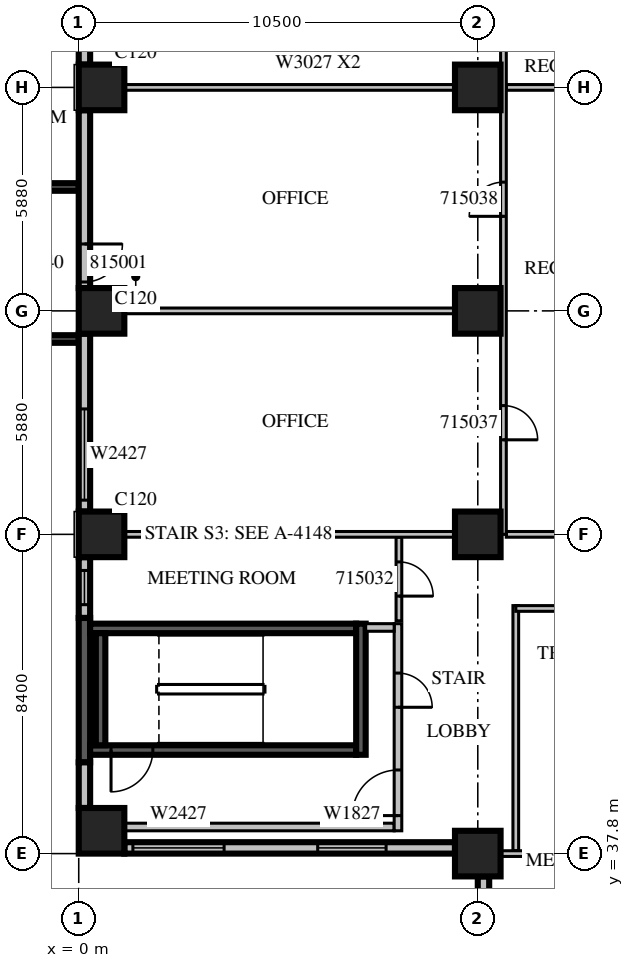
"""IFC4 building model, lengths in metres.
Left out: names, types, materials, properties, quantities, classifications, styles, units other than length and angle.
Written with IfcOpenShell. Run it as: python <this file> out.ifc"""

import sys

from ifc_helpers import new_model, si_unit, direction, frame, frame_2d, origin, origin_2d, place, context, subcontext, project, spatial, rectangle, extrude, source, transform, mapped, element, fill, save


model = new_model("IFC4")
c1 = context("Model", 3, precision=1e-05, world=origin(), true_north=direction((0.0, 1.0)))
c2 = subcontext(c1, "Body", "Model", "MODEL_VIEW")
j1 = project(units=[si_unit("LENGTHUNIT", "METRE"), si_unit("PLANEANGLEUNIT", "RADIAN")], contexts=[c1])
p1 = place(None, origin())
s1 = spatial("IfcSite", under=j1, at=p1, CompositionType="ELEMENT")
p2 = place(p1, origin())
s2 = spatial("IfcBuilding", under=s1, at=p2, CompositionType="ELEMENT")
p3 = place(p2, frame((0.0, 0.0, 74.1)))
s3 = spatial("IfcBuildingStorey", under=s2, at=p3, CompositionType="ELEMENT", Elevation=74.1)
m1 = source(origin(), c2, "Body", "SweptSolid", [
    extrude(rectangle(XDim=1.2, YDim=1.2, at=origin_2d()), origin(), (0.0, 0.0, 1.0), 4.2),
])
for number, where, z_axis, x_axis in (
    (1, (0.6, 38.4, 0.0), (0.0, 0.0, 1.0), (1.0, 0.0, 0.0)),
    (2, (10.5, 37.8, 0.0), (0.0, 0.0, 1.0), (1.0, 0.0, 0.0)),
    (3, (0.6, 46.2, 0.0), (0.0, 0.0, 1.0), (1.0, 0.0, 0.0)),
    (4, (10.5, 46.2, 0.0), (0.0, 0.0, 1.0), (1.0, 0.0, 0.0)),
    (5, (0.6, 52.08, 0.0), (0.0, 0.0, 1.0), (1.0, 0.0, 0.0)),
    (6, (10.5, 52.08, 0.0), (0.0, 0.0, 1.0), (1.0, 0.0, 0.0)),
    (7, (0.6, 57.96, 0.0), (0.0, 0.0, 1.0), (1.0, 0.0, 0.0)),
    (8, (10.5, 57.96, 0.0), (0.0, 0.0, 1.0), (1.0, 0.0, 0.0)),
):
    element("IfcColumn", number, at=place(p3, frame(where, z_axis=z_axis, x_axis=x_axis)), inside=s3, PredefinedType="COLUMN", context=c2, shape_type="MappedRepresentation", body=[
        mapped(m1, transform((0.0, 0.0, 0.0), scale=1.0)),
    ])
m2 = source(origin(), c2, "Body", "SweptSolid", [
    extrude(rectangle(XDim=3.9, YDim=0.2, at=frame_2d((1.95, 0.0))), origin(), (0.0, 0.0, 1.0), 3.8),
])
p4 = place(p3, frame((0.0, 55.34, 0.0), z_axis=(0.0, 0.0, 1.0), x_axis=(-1.0, 0.0, 0.0)))
e9 = element("IfcWall", 9, at=p4, inside=s3, PredefinedType="SOLIDWALL", context=c2, shape_type="MappedRepresentation", body=[
    mapped(m2, transform((0.0, 0.0, 0.0), scale=1.0)),
])
m3 = source(origin(), c2, "Body", "SweptSolid", [
    extrude(rectangle(XDim=2.4, YDim=2.7, at=frame_2d((1.2, 1.35))), frame((0.0, 0.11, 0.0), z_axis=(0.0, -1.0, 0.0), x_axis=(1.0, 0.0, 0.0)), (0.0, 0.0, 1.0), 0.22),
])
p5 = place(p4, frame((0.75, 0.0, 0.6)))
e10 = element("IfcOpeningElement", 10, at=p5, cuts=e9, PredefinedType="OPENING", context=c2, shape_type="MappedRepresentation", body=[
    mapped(m3, transform((0.0, 0.0, 0.0), scale=1.0)),
])
p6 = place(p3, frame((0.0, 51.34, 0.0), z_axis=(0.0, 0.0, 1.0), x_axis=(-1.0, 0.0, 0.0)))
e11 = element("IfcWall", 11, at=p6, inside=s3, PredefinedType="SOLIDWALL", context=c2, shape_type="MappedRepresentation", body=[
    mapped(m2, transform((0.0, 0.0, 0.0), scale=1.0)),
])
p7 = place(p6, frame((0.75, 0.0, 0.6)))
e12 = element("IfcOpeningElement", 12, at=p7, cuts=e11, PredefinedType="OPENING", context=c2, shape_type="MappedRepresentation", body=[
    mapped(m3, transform((0.0, 0.0, 0.0), scale=1.0)),
])
m4 = source(origin(), c2, "Body", "SweptSolid", [
    extrude(rectangle(XDim=1.08, YDim=0.3, at=frame_2d((0.54, 0.0))), origin(), (0.0, 0.0, 1.0), 3.8),
])
p8 = place(p3, frame((0.15, 59.64, 0.0), z_axis=(0.0, 0.0, 1.0), x_axis=(0.0, -1.0, 0.0)))
e13 = element("IfcWall", 13, at=p8, inside=s3, PredefinedType="STANDARD", context=c2, shape_type="MappedRepresentation", body=[
    mapped(m4, transform((0.0, 0.0, 0.0), scale=1.0)),
])
m5 = source(origin(), c2, "Body", "SweptSolid", [
    extrude(rectangle(XDim=4.68, YDim=0.3, at=frame_2d((2.34, 0.0))), origin(), (0.0, 0.0, 1.0), 3.8),
])
p9 = place(p3, frame((0.15, 57.36, 0.0), z_axis=(0.0, 0.0, 1.0), x_axis=(0.0, -1.0, 0.0)))
e14 = element("IfcWall", 14, at=p9, inside=s3, PredefinedType="STANDARD", context=c2, shape_type="MappedRepresentation", body=[
    mapped(m5, transform((0.0, 0.0, 0.0), scale=1.0)),
])
m6 = source(origin(), c2, "Body", "SweptSolid", [
    extrude(rectangle(XDim=1.0, YDim=2.1, at=frame_2d((0.5, 1.05))), frame((0.0, 0.16, 0.0), z_axis=(0.0, -1.0, 0.0), x_axis=(1.0, 0.0, 0.0)), (0.0, 0.0, 1.0), 0.32),
])
p10 = place(p9, frame((3.52, 0.0, 0.0)))
e15 = element("IfcOpeningElement", 15, at=p10, cuts=e14, PredefinedType="OPENING", context=c2, shape_type="MappedRepresentation", body=[
    mapped(m6, transform((0.0, 0.0, 0.0), scale=1.0)),
])
p11 = place(p3, frame((0.15, 51.48, 0.0), z_axis=(0.0, 0.0, 1.0), x_axis=(0.0, -1.0, 0.0)))
e16 = element("IfcWall", 16, at=p11, inside=s3, PredefinedType="STANDARD", context=c2, shape_type="MappedRepresentation", body=[
    mapped(m5, transform((0.0, 0.0, 0.0), scale=1.0)),
])
m7 = source(origin(), c2, "Body", "SweptSolid", [
    extrude(rectangle(XDim=2.4, YDim=2.7, at=frame_2d((1.2, 1.35))), frame((0.0, 0.16, 0.0), z_axis=(0.0, -1.0, 0.0), x_axis=(1.0, 0.0, 0.0)), (0.0, 0.0, 1.0), 0.32),
])
p12 = place(p11, frame((1.98, 0.0, 0.6)))
e17 = element("IfcOpeningElement", 17, at=p12, cuts=e16, PredefinedType="OPENING", context=c2, shape_type="MappedRepresentation", body=[
    mapped(m7, transform((0.0, 0.0, 0.0), scale=1.0)),
])
m8 = source(origin(), c2, "Body", "SweptSolid", [
    extrude(rectangle(XDim=1.6, YDim=0.3, at=frame_2d((0.8, 0.0))), origin(), (0.0, 0.0, 1.0), 3.8),
])
p13 = place(p3, frame((0.15, 45.6, 0.0), z_axis=(0.0, 0.0, 1.0), x_axis=(0.0, -1.0, 0.0)))
e18 = element("IfcWall", 18, at=p13, inside=s3, PredefinedType="STANDARD", context=c2, shape_type="MappedRepresentation", body=[
    mapped(m8, transform((0.0, 0.0, 0.0), scale=1.0)),
])
m9 = source(origin(), c2, "Body", "SweptSolid", [
    extrude(rectangle(XDim=0.9, YDim=2.7, at=frame_2d((0.45, 1.35))), frame((0.0, 0.16, 0.0), z_axis=(0.0, -1.0, 0.0), x_axis=(1.0, 0.0, 0.0)), (0.0, 0.0, 1.0), 0.32),
])
p14 = place(p13, frame((0.35, 0.0, 0.6)))
e19 = element("IfcOpeningElement", 19, at=p14, cuts=e18, PredefinedType="OPENING", context=c2, shape_type="MappedRepresentation", body=[
    mapped(m9, transform((0.0, 0.0, 0.0), scale=1.0)),
])
m10 = source(origin(), c2, "Body", "SweptSolid", [
    extrude(rectangle(XDim=3.8, YDim=0.3, at=frame_2d((1.9, 0.0))), origin(), (0.0, 0.0, 1.0), 3.8),
])
p15 = place(p3, frame((0.15, 44.0, 0.0), z_axis=(0.0, 0.0, 1.0), x_axis=(0.0, -1.0, 0.0)))
e20 = element("IfcWall", 20, at=p15, inside=s3, PredefinedType="SOLIDWALL", context=c2, shape_type="MappedRepresentation", body=[
    mapped(m10, transform((0.0, 0.0, 0.0), scale=1.0)),
])
m11 = source(origin(), c2, "Body", "SweptSolid", [
    extrude(rectangle(XDim=1.2, YDim=0.3, at=frame_2d((0.6, 0.0))), origin(), (0.0, 0.0, 1.0), 3.8),
])
p16 = place(p3, frame((0.15, 40.2, 0.0), z_axis=(0.0, 0.0, 1.0), x_axis=(0.0, -1.0, 0.0)))
e21 = element("IfcWall", 21, at=p16, inside=s3, PredefinedType="STANDARD", context=c2, shape_type="MappedRepresentation", body=[
    mapped(m11, transform((0.0, 0.0, 0.0), scale=1.0)),
])
m12 = source(origin(), c2, "Body", "SweptSolid", [
    extrude(rectangle(XDim=8.7, YDim=0.3, at=frame_2d((4.35, 0.0))), origin(), (0.0, 0.0, 1.0), 3.8),
])
p17 = place(p3, frame((1.2, 37.95, 0.0), z_axis=(0.0, 0.0, 1.0), x_axis=(1.0, 0.0, 0.0)))
e22 = element("IfcWall", 22, at=p17, inside=s3, PredefinedType="STANDARD", context=c2, shape_type="MappedRepresentation", body=[
    mapped(m12, transform((0.0, 0.0, 0.0), scale=1.0)),
])
p18 = place(p17, frame((0.225, 0.0, 0.6)))
e23 = element("IfcOpeningElement", 23, at=p18, cuts=e22, PredefinedType="OPENING", context=c2, shape_type="MappedRepresentation", body=[
    mapped(m7, transform((0.0, 0.0, 0.0), scale=1.0)),
])
m13 = source(origin(), c2, "Body", "SweptSolid", [
    extrude(rectangle(XDim=1.8, YDim=2.7, at=frame_2d((0.9, 1.35))), frame((0.0, 0.16, 0.0), z_axis=(0.0, -1.0, 0.0), x_axis=(1.0, 0.0, 0.0)), (0.0, 0.0, 1.0), 0.32),
])
p19 = place(p17, frame((5.088, 0.0, 0.6)))
e24 = element("IfcOpeningElement", 24, at=p19, cuts=e22, PredefinedType="OPENING", context=c2, shape_type="MappedRepresentation", body=[
    mapped(m13, transform((0.0, 0.0, 0.0), scale=1.0)),
])
m14 = source(origin(), c2, "Body", "SweptSolid", [
    extrude(rectangle(XDim=7.2, YDim=0.3, at=frame_2d((3.6, 0.0))), origin(), (0.0, 0.0, 1.0), 2.8),
])
p20 = place(p3, frame((10.65, 37.2, 0.0), z_axis=(0.0, 0.0, 1.0), x_axis=(0.0, -1.0, 0.0)))
e25 = element("IfcWall", 25, at=p20, inside=s3, PredefinedType="STANDARD", context=c2, shape_type="MappedRepresentation", body=[
    mapped(m14, transform((0.0, 0.0, 0.0), scale=1.0)),
])
m15 = source(origin(), c2, "Body", "SweptSolid", [
    extrude(rectangle(XDim=7.0, YDim=0.25, at=frame_2d((3.5, 0.0))), origin(), (0.0, 0.0, 1.0), 3.8),
])
p21 = place(p3, frame((0.3, 40.525, 0.0), z_axis=(0.0, 0.0, 1.0), x_axis=(1.0, 0.0, 0.0)))
e26 = element("IfcWall", 26, at=p21, inside=s3, PredefinedType="SOLIDWALL", context=c2, shape_type="MappedRepresentation", body=[
    mapped(m15, transform((0.0, 0.0, 0.0), scale=1.0)),
])
m16 = source(origin(), c2, "Body", "SweptSolid", [
    extrude(rectangle(XDim=1.1, YDim=2.1, at=frame_2d((0.55, 1.05))), frame((0.0, 0.135, 0.0), z_axis=(0.0, -1.0, 0.0), x_axis=(1.0, 0.0, 0.0)), (0.0, 0.0, 1.0), 0.27),
])
p22 = place(p21, frame((0.55, 0.0, 0.0)))
e27 = element("IfcOpeningElement", 27, at=p22, cuts=e26, PredefinedType="OPENING", context=c2, shape_type="MappedRepresentation", body=[
    mapped(m16, transform((0.0, 0.0, 0.0), scale=1.0)),
])
p23 = place(p3, frame((0.3, 43.725, 0.0), z_axis=(0.0, 0.0, 1.0), x_axis=(1.0, 0.0, 0.0)))
e28 = element("IfcWall", 28, at=p23, inside=s3, PredefinedType="SOLIDWALL", context=c2, shape_type="MappedRepresentation", body=[
    mapped(m15, transform((0.0, 0.0, 0.0), scale=1.0)),
])
m17 = source(origin(), c2, "Body", "SweptSolid", [
    extrude(rectangle(XDim=3.45, YDim=0.25, at=frame_2d((1.725, 0.0))), origin(), (0.0, 0.0, 1.0), 3.8),
])
p24 = place(p3, frame((7.425, 40.4, 0.0), z_axis=(0.0, 0.0, 1.0), x_axis=(0.0, 1.0, 0.0)))
e29 = element("IfcWall", 29, at=p24, inside=s3, PredefinedType="SOLIDWALL", context=c2, shape_type="MappedRepresentation", body=[
    mapped(m17, transform((0.0, 0.0, 0.0), scale=1.0)),
])
m18 = source(origin(), c2, "Body", "SweptSolid", [
    extrude(rectangle(XDim=2.95, YDim=0.25, at=frame_2d((1.475, 0.0))), origin(), (0.0, 0.0, 1.0), 3.8),
])
p25 = place(p3, frame((0.575, 40.65, 0.0), z_axis=(0.0, 0.0, 1.0), x_axis=(0.0, 1.0, 0.0)))
e30 = element("IfcWall", 30, at=p25, inside=s3, PredefinedType="SOLIDWALL", context=c2, shape_type="MappedRepresentation", body=[
    mapped(m18, transform((0.0, 0.0, 0.0), scale=1.0)),
])
m19 = source(origin(), c2, "Body", "SweptSolid", [
    extrude(rectangle(XDim=8.0, YDim=0.2, at=frame_2d((4.0, 0.0))), origin(), (0.0, 0.0, 1.0), 3.8),
])
p26 = place(p3, frame((0.3, 38.5, 0.0), z_axis=(0.0, 0.0, 1.0), x_axis=(1.0, 0.0, 0.0)))
e31 = element("IfcWall", 31, at=p26, inside=s3, PredefinedType="PARTITIONING", context=c2, shape_type="MappedRepresentation", body=[
    mapped(m19, transform((0.0, 0.0, 0.0), scale=1.0)),
])
m20 = source(origin(), c2, "Body", "SweptSolid", [
    extrude(rectangle(XDim=5.45, YDim=0.2, at=frame_2d((2.725, 0.0))), origin(), (0.0, 0.0, 1.0), 3.8),
])
p27 = place(p3, frame((8.4, 38.4, 0.0), z_axis=(0.0, 0.0, 1.0), x_axis=(0.0, 1.0, 0.0)))
e32 = element("IfcWall", 32, at=p27, inside=s3, PredefinedType="PARTITIONING", context=c2, shape_type="MappedRepresentation", body=[
    mapped(m20, transform((0.0, 0.0, 0.0), scale=1.0)),
])
m21 = source(origin(), c2, "Body", "SweptSolid", [
    extrude(rectangle(XDim=1.2, YDim=2.1, at=frame_2d((0.6, 1.05))), frame((0.0, 0.11, 0.0), z_axis=(0.0, -1.0, 0.0), x_axis=(1.0, 0.0, 0.0)), (0.0, 0.0, 1.0), 0.22),
])
p28 = place(p27, frame((0.4, 0.0, 0.0)))
e33 = element("IfcOpeningElement", 33, at=p28, cuts=e32, PredefinedType="OPENING", context=c2, shape_type="MappedRepresentation", body=[
    mapped(m21, transform((0.0, 0.0, 0.0), scale=1.0)),
])
m22 = source(origin(), c2, "Body", "SweptSolid", [
    extrude(rectangle(XDim=0.9, YDim=2.1, at=frame_2d((0.45, 1.05))), frame((0.0, 0.11, 0.0), z_axis=(0.0, -1.0, 0.0), x_axis=(1.0, 0.0, 0.0)), (0.0, 0.0, 1.0), 0.22),
])
p29 = place(p27, frame((3.25, 0.0, 0.0)))
e34 = element("IfcOpeningElement", 34, at=p29, cuts=e32, PredefinedType="OPENING", context=c2, shape_type="MappedRepresentation", body=[
    mapped(m22, transform((0.0, 0.0, 0.0), scale=1.0)),
])
m23 = source(origin(), c2, "Body", "SweptSolid", [
    extrude(rectangle(XDim=0.75, YDim=0.2, at=frame_2d((0.375, 0.0))), origin(), (0.0, 0.0, 1.0), 3.8),
])
p30 = place(p3, frame((7.55, 43.75, 0.0), z_axis=(0.0, 0.0, 1.0), x_axis=(1.0, 0.0, 0.0)))
e35 = element("IfcWall", 35, at=p30, inside=s3, PredefinedType="PARTITIONING", context=c2, shape_type="MappedRepresentation", body=[
    mapped(m23, transform((0.0, 0.0, 0.0), scale=1.0)),
])
m24 = source(origin(), c2, "Body", "SweptSolid", [
    extrude(rectangle(XDim=6.45, YDim=0.15, at=frame_2d((3.225, 0.0))), origin(), (0.0, 0.0, 1.0), 3.8),
])
p31 = place(p3, frame((11.5, 44.325, 0.0), z_axis=(0.0, 0.0, 1.0), x_axis=(0.0, -1.0, 0.0)))
e36 = element("IfcWall", 36, at=p31, inside=s3, PredefinedType="PARTITIONING", context=c2, shape_type="MappedRepresentation", body=[
    mapped(m24, transform((0.0, 0.0, 0.0), scale=1.0)),
])
m25 = source(origin(), c2, "Body", "SweptSolid", [
    extrude(rectangle(XDim=3.575, YDim=0.15, at=frame_2d((1.788, 0.0))), origin(), (0.0, 0.0, 1.0), 3.8),
])
p32 = place(p3, frame((15.075, 44.25, 0.0), z_axis=(0.0, 0.0, 1.0), x_axis=(-1.0, 0.0, 0.0)))
e37 = element("IfcWall", 37, at=p32, inside=s3, PredefinedType="PARTITIONING", context=c2, shape_type="MappedRepresentation", body=[
    mapped(m25, transform((0.0, 0.0, 0.0), scale=1.0)),
])
m26 = source(origin(), c2, "Body", "SweptSolid", [
    extrude(rectangle(XDim=2.2, YDim=0.15, at=frame_2d((1.1, 0.0))), origin(), (0.0, 0.0, 1.0), 3.8),
])
p33 = place(p3, frame((8.425, 43.925, 0.0), z_axis=(0.0, 0.0, 1.0), x_axis=(0.0, 1.0, 0.0)))
e38 = element("IfcWall", 38, at=p33, inside=s3, PredefinedType="PARTITIONING", context=c2, shape_type="MappedRepresentation", body=[
    mapped(m26, transform((0.0, 0.0, 0.0), scale=1.0)),
])
m27 = source(origin(), c2, "Body", "SweptSolid", [
    extrude(rectangle(XDim=0.9, YDim=2.1, at=frame_2d((0.45, 1.05))), frame((0.0, 0.085, 0.0), z_axis=(0.0, -1.0, 0.0), x_axis=(1.0, 0.0, 0.0)), (0.0, 0.0, 1.0), 0.17),
])
p34 = place(p33, frame((0.65, 0.0, 0.0)))
e39 = element("IfcOpeningElement", 39, at=p34, cuts=e38, PredefinedType="OPENING", context=c2, shape_type="MappedRepresentation", body=[
    mapped(m27, transform((0.0, 0.0, 0.0), scale=1.0)),
])
m28 = source(origin(), c2, "Body", "SweptSolid", [
    extrude(rectangle(XDim=3.901, YDim=0.15, at=frame_2d((1.95, 0.0))), origin(), (0.0, 0.0, 1.0), 3.8),
])
p35 = place(p3, frame((15.0, 37.8, 0.0), z_axis=(0.0, 0.0, 1.0), x_axis=(-1.0, 0.0, 0.0)))
e40 = element("IfcWall", 40, at=p35, inside=s3, PredefinedType="PARTITIONING", context=c2, shape_type="MappedRepresentation", body=[
    mapped(m28, transform((0.0, 0.0, 0.0), scale=1.0)),
])
m29 = source(origin(), c2, "Body", "SweptSolid", [
    extrude(rectangle(XDim=8.702, YDim=0.15, at=frame_2d((4.351, 0.0))), origin(), (0.0, 0.0, 1.0), 3.8),
])
for number, where, z_axis, x_axis in (
    (41, (9.901, 52.08, 0.0), (0.0, 0.0, 1.0), (-1.0, 0.0, 0.0)),
    (42, (9.901, 46.2, 0.0), (0.0, 0.0, 1.0), (-1.0, 0.0, 0.0)),
):
    element("IfcWall", number, at=place(p3, frame(where, z_axis=z_axis, x_axis=x_axis)), inside=s3, PredefinedType="PARTITIONING", context=c2, shape_type="MappedRepresentation", body=[
        mapped(m29, transform((0.0, 0.0, 0.0), scale=1.0)),
    ])
m30 = source(origin(), c2, "Body", "SweptSolid", [
    extrude(rectangle(XDim=3.75, YDim=0.15, at=frame_2d((1.875, 0.0))), origin(), (0.0, 0.0, 1.0), 3.8),
])
p36 = place(p3, frame((15.0, 46.2, 0.0), z_axis=(0.0, 0.0, 1.0), x_axis=(-1.0, 0.0, 0.0)))
e43 = element("IfcWall", 43, at=p36, inside=s3, PredefinedType="PARTITIONING", context=c2, shape_type="MappedRepresentation", body=[
    mapped(m30, transform((0.0, 0.0, 0.0), scale=1.0)),
])
p37 = place(p3, frame((9.901, 57.96, 0.0), z_axis=(0.0, 0.0, 1.0), x_axis=(-1.0, 0.0, 0.0)))
e44 = element("IfcWall", 44, at=p37, inside=s3, PredefinedType="PARTITIONING", context=c2, shape_type="MappedRepresentation", body=[
    mapped(m29, transform((0.0, 0.0, 0.0), scale=1.0)),
])
p38 = place(p3, frame((15.0, 57.96, 0.0), z_axis=(0.0, 0.0, 1.0), x_axis=(-1.0, 0.0, 0.0)))
e45 = element("IfcWall", 45, at=p38, inside=s3, PredefinedType="PARTITIONING", context=c2, shape_type="MappedRepresentation", body=[
    mapped(m30, transform((0.0, 0.0, 0.0), scale=1.0)),
])
m31 = source(origin(), c2, "Body", "SweptSolid", [
    extrude(rectangle(XDim=19.02, YDim=0.15, at=frame_2d((9.51, 0.0))), origin(), (0.0, 0.0, 1.0), 3.8),
])
p39 = place(p3, frame((11.175, 46.2, 0.0), z_axis=(0.0, 0.0, 1.0), x_axis=(0.0, 1.0, 0.0)))
e46 = element("IfcWall", 46, at=p39, inside=s3, PredefinedType="PARTITIONING", context=c2, shape_type="MappedRepresentation", body=[
    mapped(m31, transform((0.0, 0.0, 0.0), scale=1.0)),
])
p40 = place(p39, frame((2.487, 0.0, 0.0)))
e47 = element("IfcOpeningElement", 47, at=p40, cuts=e46, PredefinedType="OPENING", context=c2, shape_type="MappedRepresentation", body=[
    mapped(m27, transform((0.0, 0.0, 0.0), scale=1.0)),
])
p41 = place(p39, frame((8.367, 0.0, 0.0)))
e48 = element("IfcOpeningElement", 48, at=p41, cuts=e46, PredefinedType="OPENING", context=c2, shape_type="MappedRepresentation", body=[
    mapped(m27, transform((0.0, 0.0, 0.0), scale=1.0)),
])
p42 = place(p39, frame((16.094, 0.0, 0.0)))
e49 = element("IfcOpeningElement", 49, at=p42, cuts=e46, PredefinedType="OPENING", context=c2, shape_type="MappedRepresentation", body=[
    mapped(m27, transform((0.0, 0.0, 0.0), scale=1.0)),
])
m32 = source(origin(), c2, "Body", "SweptSolid", [
    extrude(rectangle(XDim=2.4, YDim=2.7, at=frame_2d((1.2, 1.35))), frame((0.0, 0.03, 0.0), z_axis=(0.0, -1.0, 0.0), x_axis=(1.0, 0.0, 0.0)), (0.0, 0.0, 1.0), 0.06),
])
p43 = place(p12, origin())
e50 = element("IfcWindow", 50, at=p43, inside=s3, PartitioningType="SINGLE_PANEL", PredefinedType="WINDOW", context=c2, shape_type="MappedRepresentation", body=[
    mapped(m32, transform((0.0, 0.0, 0.0), scale=1.0)),
])
fill(e17, e50)
m33 = source(origin(), c2, "Body", "SweptSolid", [
    extrude(rectangle(XDim=0.9, YDim=2.7, at=frame_2d((0.45, 1.35))), frame((0.0, 0.03, 0.0), z_axis=(0.0, -1.0, 0.0), x_axis=(1.0, 0.0, 0.0)), (0.0, 0.0, 1.0), 0.06),
])
p44 = place(p14, origin())
e51 = element("IfcWindow", 51, at=p44, inside=s3, PartitioningType="SINGLE_PANEL", PredefinedType="WINDOW", context=c2, shape_type="MappedRepresentation", body=[
    mapped(m33, transform((0.0, 0.0, 0.0), scale=1.0)),
])
fill(e19, e51)
p45 = place(p18, origin())
e52 = element("IfcWindow", 52, at=p45, inside=s3, PartitioningType="SINGLE_PANEL", PredefinedType="WINDOW", context=c2, shape_type="MappedRepresentation", body=[
    mapped(m32, transform((0.0, 0.0, 0.0), scale=1.0)),
])
fill(e23, e52)
m34 = source(origin(), c2, "Body", "SweptSolid", [
    extrude(rectangle(XDim=1.8, YDim=2.7, at=frame_2d((0.9, 1.35))), frame((0.0, 0.03, 0.0), z_axis=(0.0, -1.0, 0.0), x_axis=(1.0, 0.0, 0.0)), (0.0, 0.0, 1.0), 0.06),
])
p46 = place(p19, origin())
e53 = element("IfcWindow", 53, at=p46, inside=s3, PartitioningType="SINGLE_PANEL", PredefinedType="WINDOW", context=c2, shape_type="MappedRepresentation", body=[
    mapped(m34, transform((0.0, 0.0, 0.0), scale=1.0)),
])
fill(e24, e53)
m35 = source(origin(), c2, "Body", "SweptSolid", [
    extrude(rectangle(XDim=1.1, YDim=2.1, at=frame_2d((0.55, 1.05))), frame((0.0, 0.025, 0.0), z_axis=(0.0, -1.0, 0.0), x_axis=(1.0, 0.0, 0.0)), (0.0, 0.0, 1.0), 0.05),
])
p47 = place(p22, origin())
e54 = element("IfcDoor", 54, at=p47, inside=s3, OperationType="SINGLE_SWING_RIGHT", PredefinedType="DOOR", context=c2, shape_type="MappedRepresentation", body=[
    mapped(m35, transform((0.0, 0.0, 0.0), scale=1.0)),
])
fill(e27, e54)
m36 = source(origin(), c2, "Body", "SweptSolid", [
    extrude(rectangle(XDim=1.2, YDim=2.1, at=frame_2d((0.6, 1.05))), frame((0.0, 0.025, 0.0), z_axis=(0.0, -1.0, 0.0), x_axis=(1.0, 0.0, 0.0)), (0.0, 0.0, 1.0), 0.05),
])
p48 = place(p28, origin())
e55 = element("IfcDoor", 55, at=p48, inside=s3, OperationType="SINGLE_SWING_LEFT", PredefinedType="DOOR", context=c2, shape_type="MappedRepresentation", body=[
    mapped(m36, transform((0.0, 0.0, 0.0), scale=1.0)),
])
fill(e33, e55)
m37 = source(origin(), c2, "Body", "SweptSolid", [
    extrude(rectangle(XDim=0.9, YDim=2.1, at=frame_2d((0.45, 1.05))), frame((0.0, 0.025, 0.0), z_axis=(0.0, -1.0, 0.0), x_axis=(1.0, 0.0, 0.0)), (0.0, 0.0, 1.0), 0.05),
])
p49 = place(p29, origin())
e56 = element("IfcDoor", 56, at=p49, inside=s3, OperationType="SINGLE_SWING_RIGHT", PredefinedType="DOOR", context=c2, shape_type="MappedRepresentation", body=[
    mapped(m37, transform((0.0, 0.0, 0.0), scale=1.0)),
])
fill(e34, e56)
p50 = place(p34, origin())
e57 = element("IfcDoor", 57, at=p50, inside=s3, OperationType="SINGLE_SWING_RIGHT", PredefinedType="DOOR", context=c2, shape_type="MappedRepresentation", body=[
    mapped(m37, transform((0.0, 0.0, 0.0), scale=1.0)),
])
fill(e39, e57)
p51 = place(p40, origin())
e58 = element("IfcDoor", 58, at=p51, inside=s3, OperationType="SINGLE_SWING_RIGHT", PredefinedType="DOOR", context=c2, shape_type="MappedRepresentation", body=[
    mapped(m37, transform((0.0, 0.0, 0.0), scale=1.0)),
])
fill(e47, e58)
p52 = place(p41, origin())
e59 = element("IfcDoor", 59, at=p52, inside=s3, OperationType="SINGLE_SWING_LEFT", PredefinedType="DOOR", context=c2, shape_type="MappedRepresentation", body=[
    mapped(m37, transform((0.0, 0.0, 0.0), scale=1.0)),
])
fill(e48, e59)
m38 = source(origin(), c2, "Body", "SweptSolid", [
    extrude(rectangle(XDim=1.0, YDim=2.1, at=frame_2d((0.5, 1.05))), frame((0.0, 0.025, 0.0), z_axis=(0.0, -1.0, 0.0), x_axis=(1.0, 0.0, 0.0)), (0.0, 0.0, 1.0), 0.05),
])
p53 = place(p10, origin())
e60 = element("IfcDoor", 60, at=p53, inside=s3, OperationType="SINGLE_SWING_LEFT", PredefinedType="DOOR", context=c2, shape_type="MappedRepresentation", body=[
    mapped(m38, transform((0.0, 0.0, 0.0), scale=1.0)),
])
fill(e15, e60)
save(model, sys.argv[1])
